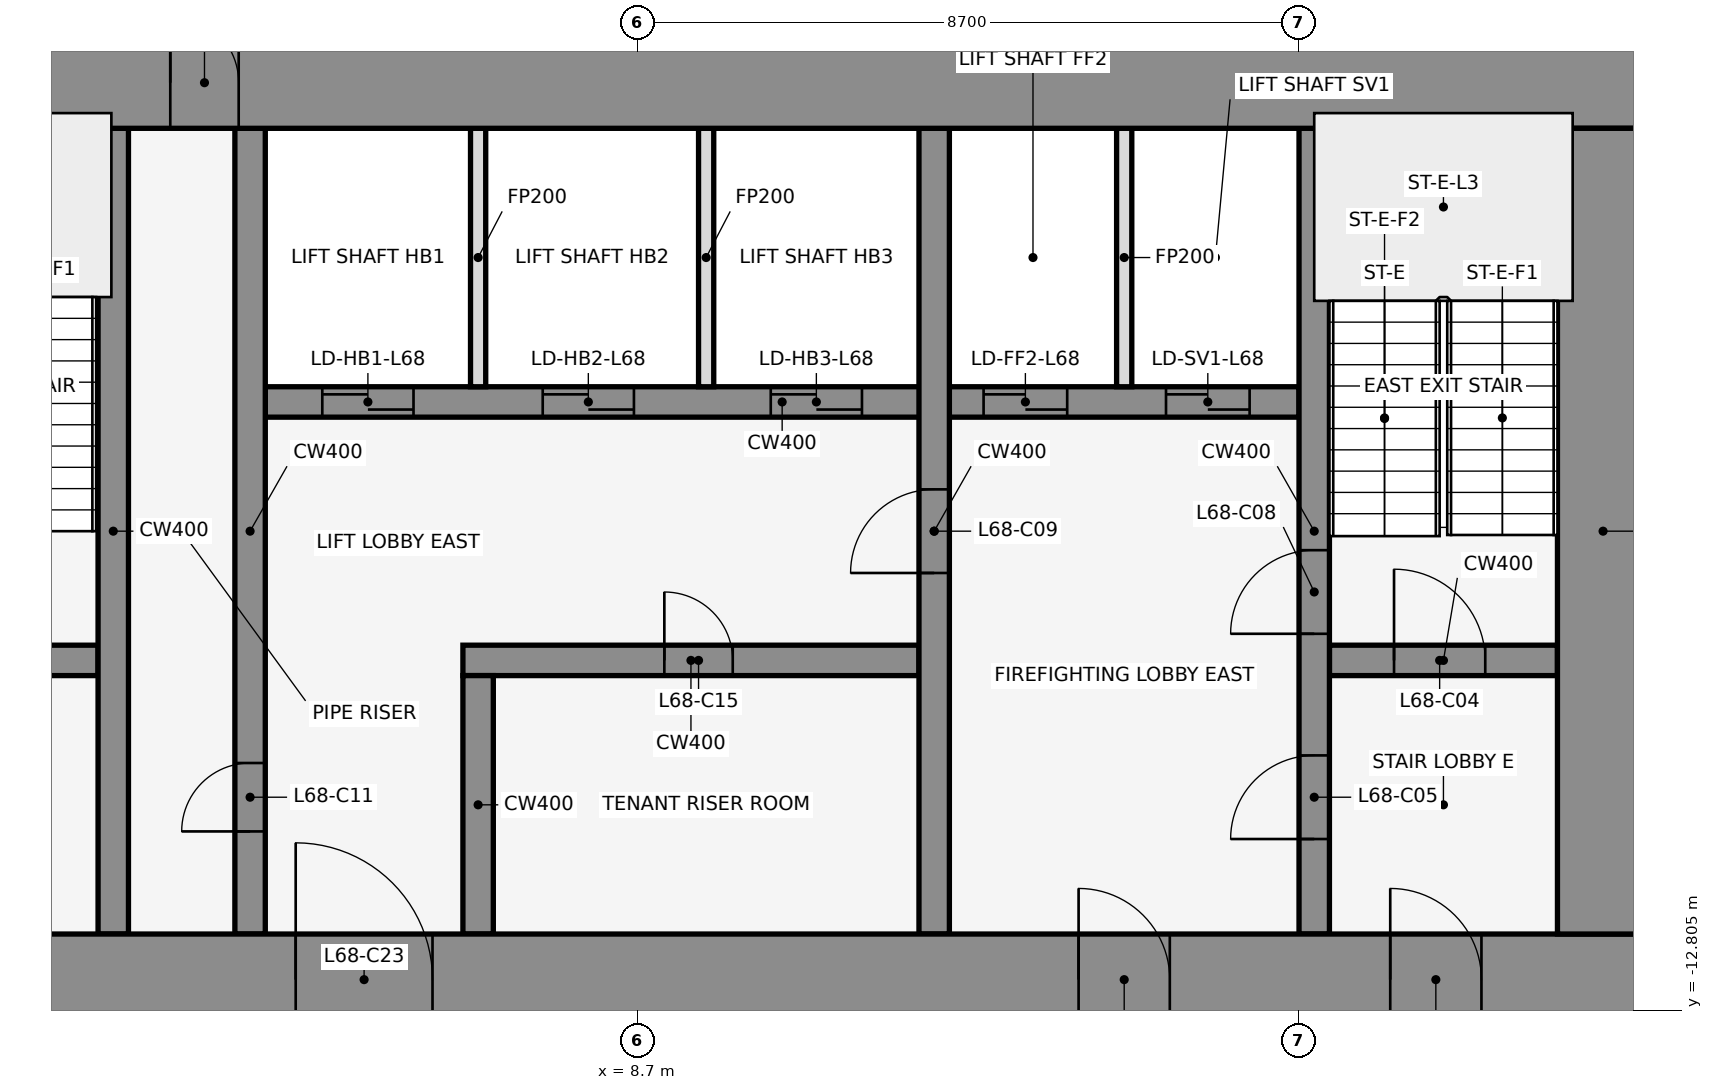
"""IFC4 building model, lengths in metres.
Left out: names, types, materials, properties, quantities, classifications, styles, units other than length and angle.
Written with IfcOpenShell. Run it as: python <this file> out.ifc"""

import sys

from ifc_helpers import new_model, si_unit, direction, frame, frame_2d, origin, place, context, subcontext, project, spatial, rectangle, extrude, element, fill, save


model = new_model("IFC4")
c1 = context("Model", 3, precision=1e-05, world=origin(), true_north=direction((0.0, 1.0)))
c2 = subcontext(c1, "Body", "Model", "MODEL_VIEW")
j1 = project(units=[si_unit("LENGTHUNIT", "METRE"), si_unit("PLANEANGLEUNIT", "RADIAN")], contexts=[c1])
p1 = place(None, origin())
s1 = spatial("IfcSite", under=j1, at=p1, CompositionType="ELEMENT")
p2 = place(p1, origin())
s2 = spatial("IfcBuilding", under=s1, at=p2, CompositionType="ELEMENT")
p3 = place(p2, frame((0.0, 0.0, 302.0)))
s3 = spatial("IfcBuildingStorey", under=s2, at=p3, CompositionType="ELEMENT", Elevation=302.0)
for number, where, z_axis, x_axis in (
    (1, (16.432, -0.105, 0.0), (0.0, 0.0, 1.0), (-0.84, 0.543, 0.0)),
    (2, (1.901, 1.08, 0.0), (0.0, 0.0, 1.0), (-0.84, -0.543, 0.0)),
):
    element("IfcWall", number, at=place(p3, frame(where, z_axis=z_axis, x_axis=x_axis)), inside=s3, PredefinedType="STANDARD", context=c2, shape_type="SweptSolid", body=[
        extrude(rectangle(XDim=2.183, YDim=0.25, at=frame_2d((1.091, 0.0))), origin(), (0.0, 0.0, 1.0), 4.35),
    ])
p4 = place(p3, frame((-1.6, -8.2, 0.0), z_axis=(0.0, 0.0, 1.0), x_axis=(1.0, 0.0, 0.0)))
e3 = element("IfcWall", 3, at=p4, inside=s3, PredefinedType="SHEAR", context=c2, shape_type="SweptSolid", body=[
    extrude(rectangle(XDim=3.2, YDim=0.4, at=frame_2d((1.6, 0.0))), origin(), (0.0, 0.0, 1.0), 4.5),
])
p5 = place(p4, frame((1.05, 0.0, 0.0)))
e4 = element("IfcOpeningElement", 4, at=p5, cuts=e3, PredefinedType="OPENING", context=c2, shape_type="SweptSolid", body=[
    extrude(rectangle(XDim=1.2, YDim=2.1, at=frame_2d((0.6, 1.05))), frame((0.0, 0.212, 0.0), z_axis=(0.0, -1.0, 0.0), x_axis=(1.0, 0.0, 0.0)), (0.0, 0.0, 1.0), 0.424),
])
p6 = place(p3, frame((6.4, -8.2, 0.0), z_axis=(0.0, 0.0, 1.0), x_axis=(1.0, 0.0, 0.0)))
e5 = element("IfcWall", 5, at=p6, inside=s3, PredefinedType="SHEAR", context=c2, shape_type="SweptSolid", body=[
    extrude(rectangle(XDim=6.0, YDim=0.4, at=frame_2d((3.0, 0.0))), origin(), (0.0, 0.0, 1.0), 4.5),
])
p7 = place(p6, frame((2.65, 0.0, 0.0)))
e6 = element("IfcOpeningElement", 6, at=p7, cuts=e5, PredefinedType="OPENING", context=c2, shape_type="SweptSolid", body=[
    extrude(rectangle(XDim=0.9, YDim=2.1, at=frame_2d((0.45, 1.05))), frame((0.0, 0.212, 0.0), z_axis=(0.0, -1.0, 0.0), x_axis=(1.0, 0.0, 0.0)), (0.0, 0.0, 1.0), 0.424),
])
p8 = place(p3, frame((17.8, -8.2, 0.0), z_axis=(0.0, 0.0, 1.0), x_axis=(1.0, 0.0, 0.0)))
e7 = element("IfcWall", 7, at=p8, inside=s3, PredefinedType="SHEAR", context=c2, shape_type="SweptSolid", body=[
    extrude(rectangle(XDim=3.0, YDim=0.4, at=frame_2d((1.5, 0.0))), origin(), (0.0, 0.0, 1.0), 4.5),
])
p9 = place(p8, frame((0.85, 0.0, 0.0)))
e8 = element("IfcOpeningElement", 8, at=p9, cuts=e7, PredefinedType="OPENING", context=c2, shape_type="SweptSolid", body=[
    extrude(rectangle(XDim=1.2, YDim=2.1, at=frame_2d((0.6, 1.05))), frame((0.0, 0.212, 0.0), z_axis=(0.0, -1.0, 0.0), x_axis=(1.0, 0.0, 0.0)), (0.0, 0.0, 1.0), 0.424),
])
p10 = place(p3, frame((3.8, -4.8, 0.0), z_axis=(0.0, 0.0, 1.0), x_axis=(1.0, 0.0, 0.0)))
e9 = element("IfcWall", 9, at=p10, inside=s3, PredefinedType="SHEAR", context=c2, shape_type="SweptSolid", body=[
    extrude(rectangle(XDim=13.6, YDim=0.4, at=frame_2d((6.8, 0.0))), origin(), (0.0, 0.0, 1.0), 4.5),
])
p11 = place(p10, frame((0.75, 0.0, 0.0)))
e10 = element("IfcOpeningElement", 10, at=p11, cuts=e9, PredefinedType="OPENING", context=c2, shape_type="SweptSolid", body=[
    extrude(rectangle(XDim=1.2, YDim=2.1, at=frame_2d((0.6, 1.05))), frame((0.0, 0.212, 0.0), z_axis=(0.0, -1.0, 0.0), x_axis=(1.0, 0.0, 0.0)), (0.0, 0.0, 1.0), 0.424),
])
p12 = place(p10, frame((3.65, 0.0, 0.0)))
e11 = element("IfcOpeningElement", 11, at=p12, cuts=e9, PredefinedType="OPENING", context=c2, shape_type="SweptSolid", body=[
    extrude(rectangle(XDim=1.2, YDim=2.1, at=frame_2d((0.6, 1.05))), frame((0.0, 0.212, 0.0), z_axis=(0.0, -1.0, 0.0), x_axis=(1.0, 0.0, 0.0)), (0.0, 0.0, 1.0), 0.424),
])
p13 = place(p10, frame((6.65, 0.0, 0.0)))
e12 = element("IfcOpeningElement", 12, at=p13, cuts=e9, PredefinedType="OPENING", context=c2, shape_type="SweptSolid", body=[
    extrude(rectangle(XDim=1.2, YDim=2.1, at=frame_2d((0.6, 1.05))), frame((0.0, 0.212, 0.0), z_axis=(0.0, -1.0, 0.0), x_axis=(1.0, 0.0, 0.0)), (0.0, 0.0, 1.0), 0.424),
])
p14 = place(p10, frame((9.45, 0.0, 0.0)))
e13 = element("IfcOpeningElement", 13, at=p14, cuts=e9, PredefinedType="OPENING", context=c2, shape_type="SweptSolid", body=[
    extrude(rectangle(XDim=1.1, YDim=2.1, at=frame_2d((0.55, 1.05))), frame((0.0, 0.212, 0.0), z_axis=(0.0, -1.0, 0.0), x_axis=(1.0, 0.0, 0.0)), (0.0, 0.0, 1.0), 0.424),
])
p15 = place(p10, frame((11.85, 0.0, 0.0)))
e14 = element("IfcOpeningElement", 14, at=p15, cuts=e9, PredefinedType="OPENING", context=c2, shape_type="SweptSolid", body=[
    extrude(rectangle(XDim=1.1, YDim=2.1, at=frame_2d((0.55, 1.05))), frame((0.0, 0.212, 0.0), z_axis=(0.0, -1.0, 0.0), x_axis=(1.0, 0.0, 0.0)), (0.0, 0.0, 1.0), 0.424),
])
p16 = place(p3, frame((1.8, -11.8, 0.0), z_axis=(0.0, 0.0, 1.0), x_axis=(0.0, 1.0, 0.0)))
e15 = element("IfcWall", 15, at=p16, inside=s3, PredefinedType="SHEAR", context=c2, shape_type="SweptSolid", body=[
    extrude(rectangle(XDim=10.6, YDim=0.4, at=frame_2d((5.3, 0.0))), origin(), (0.0, 0.0, 1.0), 4.5),
])
p17 = place(p3, frame((3.6, -11.8, 0.0), z_axis=(0.0, 0.0, 1.0), x_axis=(0.0, 1.0, 0.0)))
e16 = element("IfcWall", 16, at=p17, inside=s3, PredefinedType="SHEAR", context=c2, shape_type="SweptSolid", body=[
    extrude(rectangle(XDim=10.6, YDim=0.4, at=frame_2d((5.3, 0.0))), origin(), (0.0, 0.0, 1.0), 4.5),
])
p18 = place(p17, frame((1.35, 0.0, 0.0)))
e17 = element("IfcOpeningElement", 17, at=p18, cuts=e16, PredefinedType="OPENING", context=c2, shape_type="SweptSolid", body=[
    extrude(rectangle(XDim=0.9, YDim=2.1, at=frame_2d((0.45, 1.05))), frame((0.0, 0.212, 0.0), z_axis=(0.0, -1.0, 0.0), x_axis=(1.0, 0.0, 0.0)), (0.0, 0.0, 1.0), 0.424),
])
p19 = place(p3, frame((6.6, -11.8, 0.0), z_axis=(0.0, 0.0, 1.0), x_axis=(0.0, 1.0, 0.0)))
e18 = element("IfcWall", 18, at=p19, inside=s3, PredefinedType="SHEAR", context=c2, shape_type="SweptSolid", body=[
    extrude(rectangle(XDim=3.4, YDim=0.4, at=frame_2d((1.7, 0.0))), origin(), (0.0, 0.0, 1.0), 4.5),
])
for number, where, z_axis, x_axis in (
    (19, (6.6, -4.6, 0.0), (0.0, 0.0, 1.0), (0.0, 1.0, 0.0)),
    (20, (9.6, -4.6, 0.0), (0.0, 0.0, 1.0), (0.0, 1.0, 0.0)),
):
    element("IfcWall", number, at=place(p3, frame(where, z_axis=z_axis, x_axis=x_axis)), inside=s3, PredefinedType="PARTITIONING", context=c2, shape_type="SweptSolid", body=[
        extrude(rectangle(XDim=3.4, YDim=0.2, at=frame_2d((1.7, 0.0))), origin(), (0.0, 0.0, 1.0), 3.418),
    ])
p20 = place(p3, frame((12.6, -11.8, 0.0), z_axis=(0.0, 0.0, 1.0), x_axis=(0.0, 1.0, 0.0)))
e21 = element("IfcWall", 21, at=p20, inside=s3, PredefinedType="SHEAR", context=c2, shape_type="SweptSolid", body=[
    extrude(rectangle(XDim=10.6, YDim=0.4, at=frame_2d((5.3, 0.0))), origin(), (0.0, 0.0, 1.0), 4.5),
])
p21 = place(p20, frame((4.75, 0.0, 0.0)))
e22 = element("IfcOpeningElement", 22, at=p21, cuts=e21, PredefinedType="OPENING", context=c2, shape_type="SweptSolid", body=[
    extrude(rectangle(XDim=1.1, YDim=2.1, at=frame_2d((0.55, 1.05))), frame((0.0, 0.212, 0.0), z_axis=(0.0, -1.0, 0.0), x_axis=(1.0, 0.0, 0.0)), (0.0, 0.0, 1.0), 0.424),
])
p22 = place(p3, frame((15.1, -4.6, 0.0), z_axis=(0.0, 0.0, 1.0), x_axis=(0.0, 1.0, 0.0)))
e23 = element("IfcWall", 23, at=p22, inside=s3, PredefinedType="PARTITIONING", context=c2, shape_type="SweptSolid", body=[
    extrude(rectangle(XDim=3.4, YDim=0.2, at=frame_2d((1.7, 0.0))), origin(), (0.0, 0.0, 1.0), 3.418),
])
p23 = place(p3, frame((17.6, -11.8, 0.0), z_axis=(0.0, 0.0, 1.0), x_axis=(0.0, 1.0, 0.0)))
e24 = element("IfcWall", 24, at=p23, inside=s3, PredefinedType="SHEAR", context=c2, shape_type="SweptSolid", body=[
    extrude(rectangle(XDim=10.6, YDim=0.4, at=frame_2d((5.3, 0.0))), origin(), (0.0, 0.0, 1.0), 4.5),
])
p24 = place(p23, frame((1.25, 0.0, 0.0)))
e25 = element("IfcOpeningElement", 25, at=p24, cuts=e24, PredefinedType="OPENING", context=c2, shape_type="SweptSolid", body=[
    extrude(rectangle(XDim=1.1, YDim=2.1, at=frame_2d((0.55, 1.05))), frame((0.0, 0.212, 0.0), z_axis=(0.0, -1.0, 0.0), x_axis=(1.0, 0.0, 0.0)), (0.0, 0.0, 1.0), 0.424),
])
p25 = place(p23, frame((3.95, 0.0, 0.0)))
e26 = element("IfcOpeningElement", 26, at=p25, cuts=e24, PredefinedType="OPENING", context=c2, shape_type="SweptSolid", body=[
    extrude(rectangle(XDim=1.1, YDim=2.1, at=frame_2d((0.55, 1.05))), frame((0.0, 0.212, 0.0), z_axis=(0.0, -1.0, 0.0), x_axis=(1.0, 0.0, 0.0)), (0.0, 0.0, 1.0), 0.424),
])
p26 = place(p3, frame((-22.0, -0.6, 0.0), z_axis=(0.0, 0.0, 1.0), x_axis=(1.0, 0.0, 0.0)))
e27 = element("IfcWall", 27, at=p26, inside=s3, PredefinedType="SHEAR", context=c2, shape_type="SweptSolid", body=[
    extrude(rectangle(XDim=44.0, YDim=1.2, at=frame_2d((22.0, 0.0))), origin(), (0.0, 0.0, 1.0), 4.5),
])
p27 = place(p26, frame((18.55, 0.0, 0.0)))
e28 = element("IfcOpeningElement", 28, at=p27, cuts=e27, PredefinedType="OPENING", context=c2, shape_type="SweptSolid", body=[
    extrude(rectangle(XDim=0.9, YDim=2.1, at=frame_2d((0.45, 1.05))), frame((0.0, 0.612, 0.0), z_axis=(0.0, -1.0, 0.0), x_axis=(1.0, 0.0, 0.0)), (0.0, 0.0, 1.0), 1.224),
])
p28 = place(p26, frame((24.55, 0.0, 0.0)))
e29 = element("IfcOpeningElement", 29, at=p28, cuts=e27, PredefinedType="OPENING", context=c2, shape_type="SweptSolid", body=[
    extrude(rectangle(XDim=0.9, YDim=2.1, at=frame_2d((0.45, 1.05))), frame((0.0, 0.612, 0.0), z_axis=(0.0, -1.0, 0.0), x_axis=(1.0, 0.0, 0.0)), (0.0, 0.0, 1.0), 1.224),
])
p29 = place(p3, frame((-22.0, -12.4, 0.0), z_axis=(0.0, 0.0, 1.0), x_axis=(1.0, 0.0, 0.0)))
e30 = element("IfcWall", 30, at=p29, inside=s3, PredefinedType="SHEAR", context=c2, shape_type="SweptSolid", body=[
    extrude(rectangle(XDim=44.0, YDim=1.2, at=frame_2d((22.0, 0.0))), origin(), (0.0, 0.0, 1.0), 4.5),
])
p30 = place(p29, frame((2.2, 0.0, 0.0)))
e31 = element("IfcOpeningElement", 31, at=p30, cuts=e30, PredefinedType="OPENING", context=c2, shape_type="SweptSolid", body=[
    extrude(rectangle(XDim=1.2, YDim=2.1, at=frame_2d((0.6, 1.05))), frame((0.0, 0.612, 0.0), z_axis=(0.0, -1.0, 0.0), x_axis=(1.0, 0.0, 0.0)), (0.0, 0.0, 1.0), 1.224),
])
p31 = place(p29, frame((21.4, 0.0, 0.0)))
e32 = element("IfcOpeningElement", 32, at=p31, cuts=e30, PredefinedType="OPENING", context=c2, shape_type="SweptSolid", body=[
    extrude(rectangle(XDim=1.2, YDim=2.1, at=frame_2d((0.6, 1.05))), frame((0.0, 0.612, 0.0), z_axis=(0.0, -1.0, 0.0), x_axis=(1.0, 0.0, 0.0)), (0.0, 0.0, 1.0), 1.224),
])
p32 = place(p29, frame((40.6, 0.0, 0.0)))
e33 = element("IfcOpeningElement", 33, at=p32, cuts=e30, PredefinedType="OPENING", context=c2, shape_type="SweptSolid", body=[
    extrude(rectangle(XDim=1.2, YDim=2.1, at=frame_2d((0.6, 1.05))), frame((0.0, 0.612, 0.0), z_axis=(0.0, -1.0, 0.0), x_axis=(1.0, 0.0, 0.0)), (0.0, 0.0, 1.0), 1.224),
])
p33 = place(p29, frame((16.0, 0.0, 0.0)))
e34 = element("IfcOpeningElement", 34, at=p33, cuts=e30, PredefinedType="OPENING", context=c2, shape_type="SweptSolid", body=[
    extrude(rectangle(XDim=1.8, YDim=2.1, at=frame_2d((0.9, 1.05))), frame((0.0, 0.612, 0.0), z_axis=(0.0, -1.0, 0.0), x_axis=(1.0, 0.0, 0.0)), (0.0, 0.0, 1.0), 1.224),
])
p34 = place(p29, frame((6.3, 0.0, 0.0)))
e35 = element("IfcOpeningElement", 35, at=p34, cuts=e30, PredefinedType="OPENING", context=c2, shape_type="SweptSolid", body=[
    extrude(rectangle(XDim=1.2, YDim=2.1, at=frame_2d((0.6, 1.05))), frame((0.0, 0.612, 0.0), z_axis=(0.0, -1.0, 0.0), x_axis=(1.0, 0.0, 0.0)), (0.0, 0.0, 1.0), 1.224),
])
p35 = place(p29, frame((26.2, 0.0, 0.0)))
e36 = element("IfcOpeningElement", 36, at=p35, cuts=e30, PredefinedType="OPENING", context=c2, shape_type="SweptSolid", body=[
    extrude(rectangle(XDim=1.8, YDim=2.1, at=frame_2d((0.9, 1.05))), frame((0.0, 0.612, 0.0), z_axis=(0.0, -1.0, 0.0), x_axis=(1.0, 0.0, 0.0)), (0.0, 0.0, 1.0), 1.224),
])
p36 = place(p29, frame((36.5, 0.0, 0.0)))
e37 = element("IfcOpeningElement", 37, at=p36, cuts=e30, PredefinedType="OPENING", context=c2, shape_type="SweptSolid", body=[
    extrude(rectangle(XDim=1.2, YDim=2.1, at=frame_2d((0.6, 1.05))), frame((0.0, 0.612, 0.0), z_axis=(0.0, -1.0, 0.0), x_axis=(1.0, 0.0, 0.0)), (0.0, 0.0, 1.0), 1.224),
])
p37 = place(p3, frame((21.4, -11.8, 0.0), z_axis=(0.0, 0.0, 1.0), x_axis=(0.0, 1.0, 0.0)))
e38 = element("IfcWall", 38, at=p37, inside=s3, PredefinedType="SHEAR", context=c2, shape_type="SweptSolid", body=[
    extrude(rectangle(XDim=10.6, YDim=1.2, at=frame_2d((5.3, 0.0))), origin(), (0.0, 0.0, 1.0), 4.5),
])
p38 = place(p9, origin())
e39 = element("IfcDoor", 39, at=p38, inside=s3, OperationType="SINGLE_SWING_RIGHT", PredefinedType="DOOR", context=c2, shape_type="SweptSolid", body=[
    extrude(rectangle(XDim=1.2, YDim=2.1, at=frame_2d((0.6, 1.05))), frame((0.0, 0.025, 0.0), z_axis=(0.0, -1.0, 0.0), x_axis=(1.0, 0.0, 0.0)), (0.0, 0.0, 1.0), 0.05),
])
fill(e8, e39)
p39 = place(p24, origin())
e40 = element("IfcDoor", 40, at=p39, inside=s3, OperationType="SINGLE_SWING_LEFT", PredefinedType="DOOR", context=c2, shape_type="SweptSolid", body=[
    extrude(rectangle(XDim=1.1, YDim=2.1, at=frame_2d((0.55, 1.05))), frame((0.0, 0.025, 0.0), z_axis=(0.0, -1.0, 0.0), x_axis=(1.0, 0.0, 0.0)), (0.0, 0.0, 1.0), 0.05),
])
fill(e25, e40)
p40 = place(p11, origin())
e41 = element("IfcDoor", 41, at=p40, inside=s3, OperationType="DOUBLE_DOOR_SLIDING", PredefinedType="DOOR", context=c2, shape_type="SweptSolid", body=[
    extrude(rectangle(XDim=1.2, YDim=2.1, at=frame_2d((0.6, 1.05))), frame((0.0, 0.025, 0.0), z_axis=(0.0, -1.0, 0.0), x_axis=(1.0, 0.0, 0.0)), (0.0, 0.0, 1.0), 0.05),
])
fill(e10, e41)
p41 = place(p12, origin())
e42 = element("IfcDoor", 42, at=p41, inside=s3, OperationType="DOUBLE_DOOR_SLIDING", PredefinedType="DOOR", context=c2, shape_type="SweptSolid", body=[
    extrude(rectangle(XDim=1.2, YDim=2.1, at=frame_2d((0.6, 1.05))), frame((0.0, 0.025, 0.0), z_axis=(0.0, -1.0, 0.0), x_axis=(1.0, 0.0, 0.0)), (0.0, 0.0, 1.0), 0.05),
])
fill(e11, e42)
p42 = place(p13, origin())
e43 = element("IfcDoor", 43, at=p42, inside=s3, OperationType="DOUBLE_DOOR_SLIDING", PredefinedType="DOOR", context=c2, shape_type="SweptSolid", body=[
    extrude(rectangle(XDim=1.2, YDim=2.1, at=frame_2d((0.6, 1.05))), frame((0.0, 0.025, 0.0), z_axis=(0.0, -1.0, 0.0), x_axis=(1.0, 0.0, 0.0)), (0.0, 0.0, 1.0), 0.05),
])
fill(e12, e43)
p43 = place(p14, origin())
e44 = element("IfcDoor", 44, at=p43, inside=s3, OperationType="DOUBLE_DOOR_SLIDING", PredefinedType="DOOR", context=c2, shape_type="SweptSolid", body=[
    extrude(rectangle(XDim=1.1, YDim=2.1, at=frame_2d((0.55, 1.05))), frame((0.0, 0.025, 0.0), z_axis=(0.0, -1.0, 0.0), x_axis=(1.0, 0.0, 0.0)), (0.0, 0.0, 1.0), 0.05),
])
fill(e13, e44)
p44 = place(p15, origin())
e45 = element("IfcDoor", 45, at=p44, inside=s3, OperationType="DOUBLE_DOOR_SLIDING", PredefinedType="DOOR", context=c2, shape_type="SweptSolid", body=[
    extrude(rectangle(XDim=1.1, YDim=2.1, at=frame_2d((0.55, 1.05))), frame((0.0, 0.025, 0.0), z_axis=(0.0, -1.0, 0.0), x_axis=(1.0, 0.0, 0.0)), (0.0, 0.0, 1.0), 0.05),
])
fill(e14, e45)
p45 = place(p25, origin())
e46 = element("IfcDoor", 46, at=p45, inside=s3, OperationType="SINGLE_SWING_RIGHT", PredefinedType="DOOR", context=c2, shape_type="SweptSolid", body=[
    extrude(rectangle(XDim=1.1, YDim=2.1, at=frame_2d((0.55, 1.05))), frame((0.0, 0.025, 0.0), z_axis=(0.0, -1.0, 0.0), x_axis=(1.0, 0.0, 0.0)), (0.0, 0.0, 1.0), 0.05),
])
fill(e26, e46)
p46 = place(p21, frame((1.1, 0.0, 0.0), z_axis=(0.0, 0.0, 1.0), x_axis=(-1.0, 0.0, 0.0)))
e47 = element("IfcDoor", 47, at=p46, inside=s3, OperationType="SINGLE_SWING_RIGHT", PredefinedType="DOOR", context=c2, shape_type="SweptSolid", body=[
    extrude(rectangle(XDim=1.1, YDim=2.1, at=frame_2d((0.55, 1.05))), frame((0.0, 0.025, 0.0), z_axis=(0.0, -1.0, 0.0), x_axis=(1.0, 0.0, 0.0)), (0.0, 0.0, 1.0), 0.05),
])
fill(e22, e47)
p47 = place(p18, origin())
e48 = element("IfcDoor", 48, at=p47, inside=s3, OperationType="SINGLE_SWING_LEFT", PredefinedType="DOOR", context=c2, shape_type="SweptSolid", body=[
    extrude(rectangle(XDim=0.9, YDim=2.1, at=frame_2d((0.45, 1.05))), frame((0.0, 0.025, 0.0), z_axis=(0.0, -1.0, 0.0), x_axis=(1.0, 0.0, 0.0)), (0.0, 0.0, 1.0), 0.05),
])
fill(e17, e48)
p48 = place(p7, frame((0.9, 0.0, 0.0), z_axis=(0.0, 0.0, 1.0), x_axis=(-1.0, 0.0, 0.0)))
e49 = element("IfcDoor", 49, at=p48, inside=s3, OperationType="SINGLE_SWING_RIGHT", PredefinedType="DOOR", context=c2, shape_type="SweptSolid", body=[
    extrude(rectangle(XDim=0.9, YDim=2.1, at=frame_2d((0.45, 1.05))), frame((0.0, 0.025, 0.0), z_axis=(0.0, -1.0, 0.0), x_axis=(1.0, 0.0, 0.0)), (0.0, 0.0, 1.0), 0.05),
])
fill(e6, e49)
p49 = place(p28, origin())
e50 = element("IfcDoor", 50, at=p49, inside=s3, OperationType="SINGLE_SWING_LEFT", PredefinedType="DOOR", context=c2, shape_type="SweptSolid", body=[
    extrude(rectangle(XDim=0.9, YDim=2.1, at=frame_2d((0.45, 1.05))), frame((0.0, 0.025, 0.0), z_axis=(0.0, -1.0, 0.0), x_axis=(1.0, 0.0, 0.0)), (0.0, 0.0, 1.0), 0.05),
])
fill(e29, e50)
p50 = place(p32, frame((1.2, 0.0, 0.0), z_axis=(0.0, 0.0, 1.0), x_axis=(-1.0, 0.0, 0.0)))
e51 = element("IfcDoor", 51, at=p50, inside=s3, OperationType="SINGLE_SWING_RIGHT", PredefinedType="DOOR", context=c2, shape_type="SweptSolid", body=[
    extrude(rectangle(XDim=1.2, YDim=2.1, at=frame_2d((0.6, 1.05))), frame((0.0, 0.025, 0.0), z_axis=(0.0, -1.0, 0.0), x_axis=(1.0, 0.0, 0.0)), (0.0, 0.0, 1.0), 0.05),
])
fill(e33, e51)
p51 = place(p35, origin())
e52 = element("IfcDoor", 52, at=p51, inside=s3, OperationType="SINGLE_SWING_LEFT", PredefinedType="DOOR", context=c2, shape_type="SweptSolid", body=[
    extrude(rectangle(XDim=1.8, YDim=2.1, at=frame_2d((0.9, 1.05))), frame((0.0, 0.025, 0.0), z_axis=(0.0, -1.0, 0.0), x_axis=(1.0, 0.0, 0.0)), (0.0, 0.0, 1.0), 0.05),
])
fill(e36, e52)
p52 = place(p36, frame((1.2, 0.0, 0.0), z_axis=(0.0, 0.0, 1.0), x_axis=(-1.0, 0.0, 0.0)))
e53 = element("IfcDoor", 53, at=p52, inside=s3, OperationType="SINGLE_SWING_RIGHT", PredefinedType="DOOR", context=c2, shape_type="SweptSolid", body=[
    extrude(rectangle(XDim=1.2, YDim=2.1, at=frame_2d((0.6, 1.05))), frame((0.0, 0.025, 0.0), z_axis=(0.0, -1.0, 0.0), x_axis=(1.0, 0.0, 0.0)), (0.0, 0.0, 1.0), 0.05),
])
fill(e37, e53)
save(model, sys.argv[1])
